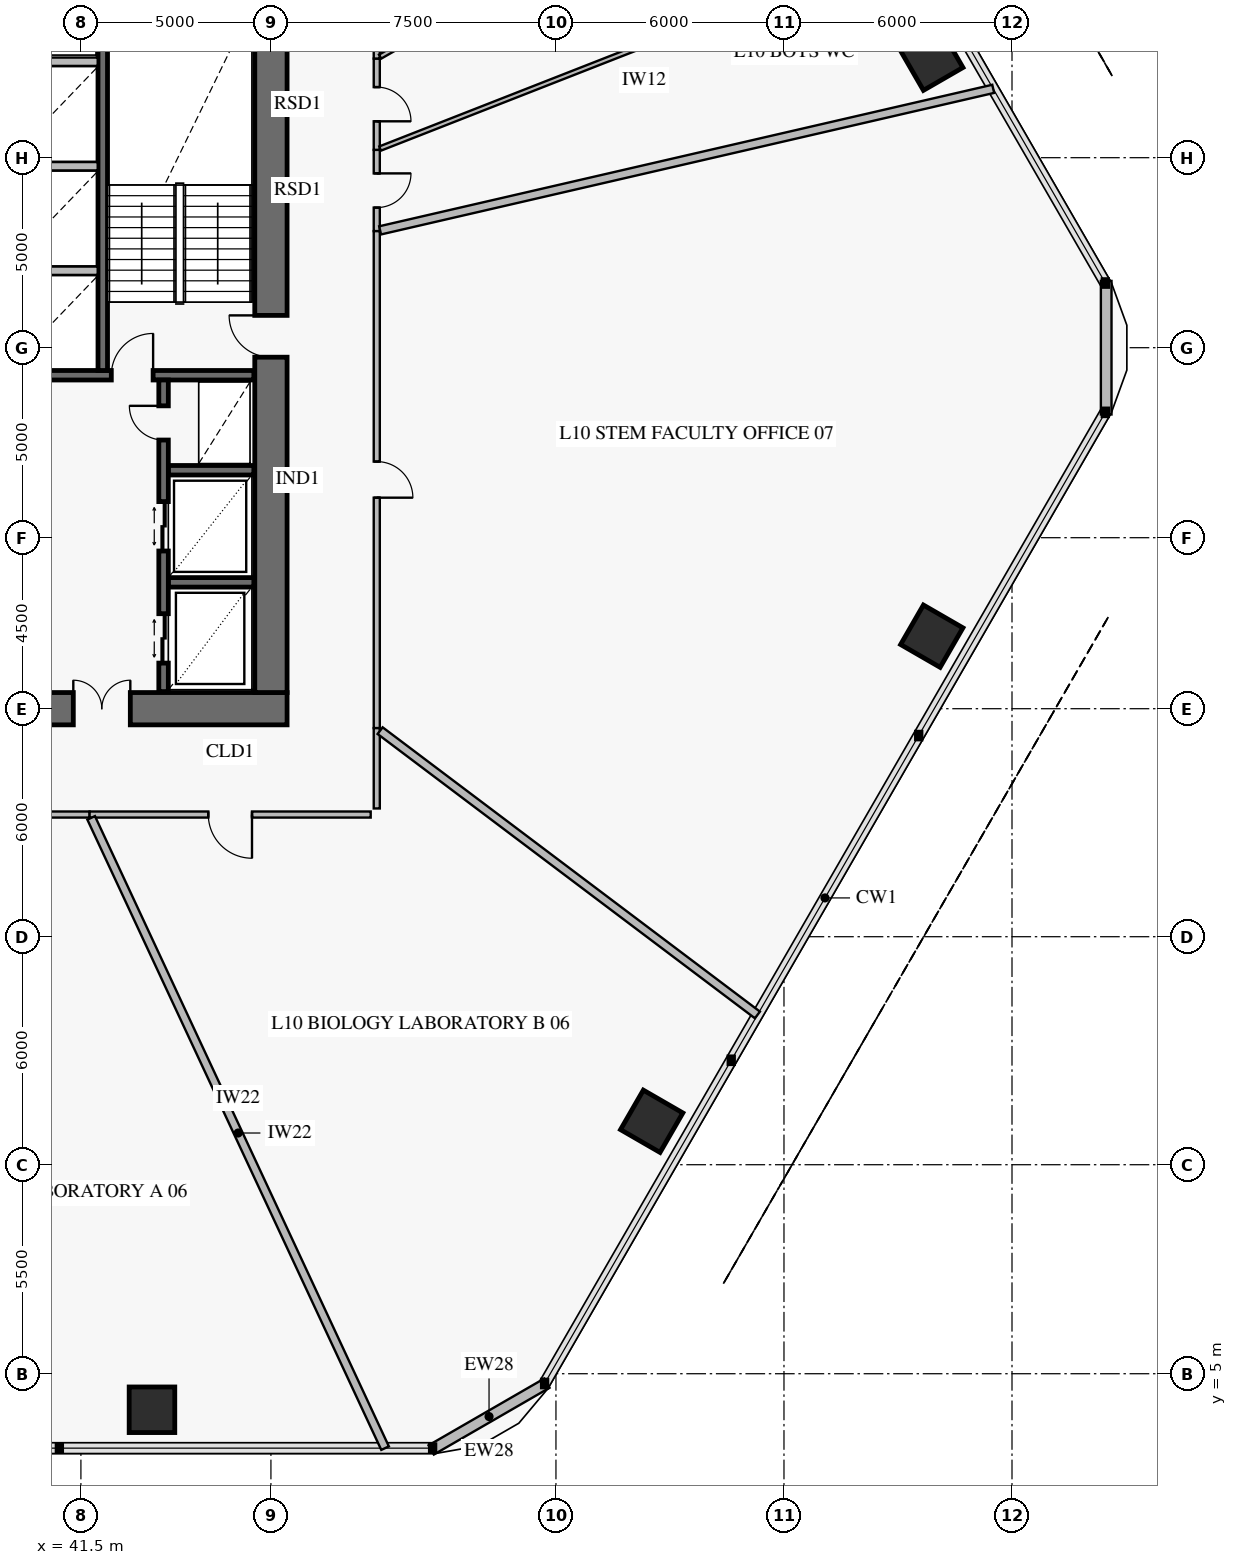
"""IFC4 building model, lengths in metres.
Left out: names, types, materials, properties, quantities, classifications, styles, units other than length and angle.
Written with IfcOpenShell. Run it as: python <this file> out.ifc"""

import sys

from ifc_helpers import new_model, si_unit, direction, frame, frame_2d, origin, origin_2d, place, context, subcontext, project, spatial, rectangle, extrude, element, fill, save


model = new_model("IFC4")
c1 = context("Model", 3, precision=1e-05, world=origin(), true_north=direction((0.0, 1.0)))
c2 = subcontext(c1, "Body", "Model", "MODEL_VIEW")
j1 = project(units=[si_unit("LENGTHUNIT", "METRE"), si_unit("PLANEANGLEUNIT", "RADIAN")], contexts=[c1])
p1 = place(None, origin())
s1 = spatial("IfcSite", under=j1, at=p1, CompositionType="ELEMENT")
p2 = place(p1, origin())
s2 = spatial("IfcBuilding", under=s1, at=p2, CompositionType="ELEMENT")
p3 = place(p2, frame((0.0, 0.0, 41.4)))
s3 = spatial("IfcBuildingStorey", under=s2, at=p3, CompositionType="ELEMENT", Elevation=41.4)
p4 = place(p3, frame((37.35, 22.5, 0.0), z_axis=(0.0, 0.0, 1.0), x_axis=(1.0, 0.0, 0.0)))
e1 = element("IfcWall", 1, at=p4, inside=s3, PredefinedType="SHEAR", context=c2, shape_type="SweptSolid", body=[
    extrude(rectangle(XDim=9.575, YDim=0.85, at=frame_2d((4.788, 0.0))), origin(), (0.0, 0.0, 1.0), 4.2),
])
p5 = place(p4, frame((3.95, 0.0, 0.0)))
e2 = element("IfcOpeningElement", 2, at=p5, cuts=e1, PredefinedType="OPENING", context=c2, shape_type="SweptSolid", body=[
    extrude(rectangle(XDim=1.5, YDim=2.15, at=frame_2d((0.75, 1.075))), frame((0.0, 0.437, 0.0), z_axis=(0.0, -1.0, 0.0), x_axis=(1.0, 0.0, 0.0)), (0.0, 0.0, 1.0), 0.874),
])
p6 = place(p3, frame((46.5, 22.925, 0.0), z_axis=(0.0, 0.0, 1.0), x_axis=(0.0, 1.0, 0.0)))
e3 = element("IfcWall", 3, at=p6, inside=s3, PredefinedType="SHEAR", context=c2, shape_type="SweptSolid", body=[
    extrude(rectangle(XDim=18.15, YDim=0.85, at=frame_2d((9.075, 0.0))), origin(), (0.0, 0.0, 1.0), 4.2),
])
p7 = place(p6, frame((8.825, 0.0, 0.0)))
e4 = element("IfcOpeningElement", 4, at=p7, cuts=e3, PredefinedType="OPENING", context=c2, shape_type="SweptSolid", body=[
    extrude(rectangle(XDim=1.1, YDim=2.15, at=frame_2d((0.55, 1.075))), frame((0.0, 0.437, 0.0), z_axis=(0.0, -1.0, 0.0), x_axis=(1.0, 0.0, 0.0)), (0.0, 0.0, 1.0), 0.874),
])
for number, where, z_axis, x_axis in (
    (5, (63.889, 39.592, 0.0), (0.0, 0.0, 1.0), (-0.5, 0.866, 0.0)),
    (6, (43.37, 4.052, 0.0), (0.0, 0.0, 1.0), (1.0, 0.0, 0.0)),
    (7, (56.519, 11.643, 0.0), (0.0, 0.0, 1.0), (0.5, 0.866, 0.0)),
    (8, (63.889, 24.408, 0.0), (0.0, 0.0, 1.0), (0.5, 0.866, 0.0)),
):
    element("IfcColumn", number, at=place(p3, frame(where, z_axis=z_axis, x_axis=x_axis)), inside=s3, PredefinedType="COLUMN", context=c2, shape_type="SweptSolid", body=[
        extrude(rectangle(XDim=1.2, YDim=1.2, at=origin_2d()), origin(), (0.0, 0.0, 1.0), 3.92),
    ])
p8 = place(p3, frame((53.761, 4.751, 0.0), z_axis=(0.0, 0.0, 1.0), x_axis=(-0.866007452331, -0.500031091541, 0.0)))
e9 = element("IfcWall", 9, at=p8, inside=s3, PredefinedType="SOLIDWALL", context=c2, shape_type="SweptSolid", body=[
    extrude(rectangle(XDim=3.515, YDim=0.28, at=frame_2d((1.757, 0.0))), origin(), (0.0, 0.0, 1.0), 3.92),
])
p9 = place(p3, frame((68.479, 33.758, 0.0), z_axis=(0.0, 0.0, 1.0), x_axis=(0.0, -1.0, 0.0)))
e10 = element("IfcWall", 10, at=p9, inside=s3, PredefinedType="SOLIDWALL", context=c2, shape_type="SweptSolid", body=[
    extrude(rectangle(XDim=3.515, YDim=0.28, at=frame_2d((1.758, 0.0))), origin(), (0.0, 0.0, 1.0), 3.92),
])
p10 = place(p3, frame((25.95, 31.275, 0.0), z_axis=(0.0, 0.0, 1.0), x_axis=(1.0, 0.0, 0.0)))
e11 = element("IfcWall", 11, at=p10, inside=s3, PredefinedType="SOLIDWALL", context=c2, shape_type="SweptSolid", body=[
    extrude(rectangle(XDim=20.1, YDim=0.25, at=frame_2d((10.05, 0.0))), origin(), (0.0, 0.0, 1.0), 4.2),
])
p11 = place(p10, frame((2.6, 0.0, 0.0)))
e12 = element("IfcOpeningElement", 12, at=p11, cuts=e11, PredefinedType="OPENING", context=c2, shape_type="SweptSolid", body=[
    extrude(rectangle(XDim=1.1, YDim=2.15, at=frame_2d((0.55, 1.075))), frame((0.0, 0.137, 0.0), z_axis=(0.0, -1.0, 0.0), x_axis=(1.0, 0.0, 0.0)), (0.0, 0.0, 1.0), 0.274),
])
p12 = place(p10, frame((10.6, 0.0, 0.0)))
e13 = element("IfcOpeningElement", 13, at=p12, cuts=e11, PredefinedType="OPENING", context=c2, shape_type="SweptSolid", body=[
    extrude(rectangle(XDim=1.1, YDim=2.15, at=frame_2d((0.55, 1.075))), frame((0.0, 0.137, 0.0), z_axis=(0.0, -1.0, 0.0), x_axis=(1.0, 0.0, 0.0)), (0.0, 0.0, 1.0), 0.274),
])
p13 = place(p10, frame((16.35, 0.0, 0.0)))
e14 = element("IfcOpeningElement", 14, at=p13, cuts=e11, PredefinedType="OPENING", context=c2, shape_type="SweptSolid", body=[
    extrude(rectangle(XDim=1.1, YDim=2.15, at=frame_2d((0.55, 1.075))), frame((0.0, 0.137, 0.0), z_axis=(0.0, -1.0, 0.0), x_axis=(1.0, 0.0, 0.0)), (0.0, 0.0, 1.0), 0.274),
])
p14 = place(p3, frame((42.075, 31.4, 0.0), z_axis=(0.0, 0.0, 1.0), x_axis=(0.0, 1.0, 0.0)))
e15 = element("IfcWall", 15, at=p14, inside=s3, PredefinedType="SOLIDWALL", context=c2, shape_type="SweptSolid", body=[
    extrude(rectangle(XDim=9.7, YDim=0.25, at=frame_2d((4.85, 0.0))), origin(), (0.0, 0.0, 1.0), 4.2),
])
for number, where, z_axis, x_axis in (
    (16, (43.8, 25.825, 0.0), (0.0, 0.0, 1.0), (1.0, 0.0, 0.0)),
    (17, (43.8, 28.775, 0.0), (0.0, 0.0, 1.0), (1.0, 0.0, 0.0)),
):
    element("IfcWall", number, at=place(p3, frame(where, z_axis=z_axis, x_axis=x_axis)), inside=s3, PredefinedType="SOLIDWALL", context=c2, shape_type="SweptSolid", body=[
        extrude(rectangle(XDim=2.25, YDim=0.25, at=frame_2d((1.125, 0.0))), origin(), (0.0, 0.0, 1.0), 4.2),
    ])
p15 = place(p3, frame((43.675, 22.95, 0.0), z_axis=(0.0, 0.0, 1.0), x_axis=(0.0, 1.0, 0.0)))
e18 = element("IfcWall", 18, at=p15, inside=s3, PredefinedType="SOLIDWALL", context=c2, shape_type="SweptSolid", body=[
    extrude(rectangle(XDim=8.2, YDim=0.25, at=frame_2d((4.1, 0.0))), origin(), (0.0, 0.0, 1.0), 4.2),
])
p16 = place(p15, frame((0.75, 0.0, 0.0)))
e19 = element("IfcOpeningElement", 19, at=p16, cuts=e18, PredefinedType="OPENING", context=c2, shape_type="SweptSolid", body=[
    extrude(rectangle(XDim=1.3, YDim=2.3, at=frame_2d((0.65, 1.15))), frame((0.0, 0.137, 0.0), z_axis=(0.0, -1.0, 0.0), x_axis=(1.0, 0.0, 0.0)), (0.0, 0.0, 1.0), 0.274),
])
p17 = place(p15, frame((3.7, 0.0, 0.0)))
e20 = element("IfcOpeningElement", 20, at=p17, cuts=e18, PredefinedType="OPENING", context=c2, shape_type="SweptSolid", body=[
    extrude(rectangle(XDim=1.3, YDim=2.3, at=frame_2d((0.65, 1.15))), frame((0.0, 0.137, 0.0), z_axis=(0.0, -1.0, 0.0), x_axis=(1.0, 0.0, 0.0)), (0.0, 0.0, 1.0), 0.274),
])
p18 = place(p15, frame((6.62, 0.0, 0.0)))
e21 = element("IfcOpeningElement", 21, at=p18, cuts=e18, PredefinedType="OPENING", context=c2, shape_type="SweptSolid", body=[
    extrude(rectangle(XDim=0.9, YDim=2.1, at=frame_2d((0.45, 1.05))), frame((0.0, 0.137, 0.0), z_axis=(0.0, -1.0, 0.0), x_axis=(1.0, 0.0, 0.0)), (0.0, 0.0, 1.0), 0.274),
])
p19 = place(p3, frame((49.285, 35.067, 0.0), z_axis=(0.0, 0.0, 1.0), x_axis=(0.0, 1.0, 0.0)))
e22 = element("IfcWall", 22, at=p19, inside=s3, PredefinedType="PARTITIONING", context=c2, shape_type="SweptSolid", body=[
    extrude(rectangle(XDim=2.139, YDim=0.16, at=frame_2d((1.07, 0.0))), origin(), (0.0, 0.0, 1.0), 3.22),
])
p20 = place(p19, frame((0.62, 0.0, 0.0)))
e23 = element("IfcOpeningElement", 23, at=p20, cuts=e22, PredefinedType="OPENING", context=c2, shape_type="SweptSolid", body=[
    extrude(rectangle(XDim=0.9, YDim=2.1, at=frame_2d((0.45, 1.05))), frame((0.0, 0.092, 0.0), z_axis=(0.0, -1.0, 0.0), x_axis=(1.0, 0.0, 0.0)), (0.0, 0.0, 1.0), 0.184),
])
p21 = place(p3, frame((49.285, 37.206, 0.0), z_axis=(0.0, 0.0, 1.0), x_axis=(0.0, 1.0, 0.0)))
e24 = element("IfcWall", 24, at=p21, inside=s3, PredefinedType="PARTITIONING", context=c2, shape_type="SweptSolid", body=[
    extrude(rectangle(XDim=2.402, YDim=0.16, at=frame_2d((1.201, 0.0))), origin(), (0.0, 0.0, 1.0), 3.92),
])
p22 = place(p21, frame((0.751, 0.0, 0.0)))
e25 = element("IfcOpeningElement", 25, at=p22, cuts=e24, PredefinedType="OPENING", context=c2, shape_type="SweptSolid", body=[
    extrude(rectangle(XDim=0.9, YDim=2.1, at=frame_2d((0.45, 1.05))), frame((0.0, 0.092, 0.0), z_axis=(0.0, -1.0, 0.0), x_axis=(1.0, 0.0, 0.0)), (0.0, 0.0, 1.0), 0.184),
])
p23 = place(p3, frame((49.285, 39.608, 0.0), z_axis=(0.0, 0.0, 1.0), x_axis=(0.0, 1.0, 0.0)))
e26 = element("IfcWall", 26, at=p23, inside=s3, PredefinedType="PARTITIONING", context=c2, shape_type="SweptSolid", body=[
    extrude(rectangle(XDim=2.403, YDim=0.16, at=frame_2d((1.201, 0.0))), origin(), (0.0, 0.0, 1.0), 3.92),
])
p24 = place(p23, frame((0.751, 0.0, 0.0)))
e27 = element("IfcOpeningElement", 27, at=p24, cuts=e26, PredefinedType="OPENING", context=c2, shape_type="SweptSolid", body=[
    extrude(rectangle(XDim=0.9, YDim=2.1, at=frame_2d((0.45, 1.05))), frame((0.0, 0.092, 0.0), z_axis=(0.0, -1.0, 0.0), x_axis=(1.0, 0.0, 0.0)), (0.0, 0.0, 1.0), 0.184),
])
p25 = place(p3, frame((35.356, 19.715, 0.0), z_axis=(0.0, 0.0, 1.0), x_axis=(1.0, 0.0, 0.0)))
e28 = element("IfcWall", 28, at=p25, inside=s3, PredefinedType="PARTITIONING", context=c2, shape_type="SweptSolid", body=[
    extrude(rectangle(XDim=6.372, YDim=0.16, at=frame_2d((3.186, 0.0))), origin(), (0.0, 0.0, 1.0), 3.22),
])
p26 = place(p25, frame((2.611, 0.0, 0.0)))
e29 = element("IfcOpeningElement", 29, at=p26, cuts=e28, PredefinedType="OPENING", context=c2, shape_type="SweptSolid", body=[
    extrude(rectangle(XDim=1.15, YDim=2.2, at=frame_2d((0.575, 1.1))), frame((0.0, 0.092, 0.0), z_axis=(0.0, -1.0, 0.0), x_axis=(1.0, 0.0, 0.0)), (0.0, 0.0, 1.0), 0.184),
])
p27 = place(p3, frame((41.729, 19.715, 0.0), z_axis=(0.0, 0.0, 1.0), x_axis=(1.0, 0.0, 0.0)))
e30 = element("IfcWall", 30, at=p27, inside=s3, PredefinedType="PARTITIONING", context=c2, shape_type="SweptSolid", body=[
    extrude(rectangle(XDim=7.396, YDim=0.16, at=frame_2d((3.698, 0.0))), origin(), (0.0, 0.0, 1.0), 3.22),
])
p28 = place(p27, frame((3.123, 0.0, 0.0)))
e31 = element("IfcOpeningElement", 31, at=p28, cuts=e30, PredefinedType="OPENING", context=c2, shape_type="SweptSolid", body=[
    extrude(rectangle(XDim=1.15, YDim=2.2, at=frame_2d((0.575, 1.1))), frame((0.0, 0.092, 0.0), z_axis=(0.0, -1.0, 0.0), x_axis=(1.0, 0.0, 0.0)), (0.0, 0.0, 1.0), 0.184),
])
p29 = place(p3, frame((49.285, 21.989, 0.0), z_axis=(0.0, 0.0, 1.0), x_axis=(0.0, 1.0, 0.0)))
e32 = element("IfcWall", 32, at=p29, inside=s3, PredefinedType="PARTITIONING", context=c2, shape_type="SweptSolid", body=[
    extrude(rectangle(XDim=13.078, YDim=0.16, at=frame_2d((6.539, 0.0))), origin(), (0.0, 0.0, 1.0), 3.22),
])
p30 = place(p29, frame((6.064, 0.0, 0.0)))
e33 = element("IfcOpeningElement", 33, at=p30, cuts=e32, PredefinedType="OPENING", context=c2, shape_type="SweptSolid", body=[
    extrude(rectangle(XDim=0.95, YDim=2.1, at=frame_2d((0.475, 1.05))), frame((0.0, 0.092, 0.0), z_axis=(0.0, -1.0, 0.0), x_axis=(1.0, 0.0, 0.0)), (0.0, 0.0, 1.0), 0.184),
])
for number, where, z_axis, x_axis in (
    (34, (39.558, 34.025, 0.0), (0.0, 0.0, 1.0), (1.0, 0.0, 0.0)),
    (35, (39.558, 36.775, 0.0), (0.0, 0.0, 1.0), (1.0, 0.0, 0.0)),
    (36, (39.558, 39.525, 0.0), (0.0, 0.0, 1.0), (1.0, 0.0, 0.0)),
):
    element("IfcWall", number, at=place(p3, frame(where, z_axis=z_axis, x_axis=x_axis)), inside=s3, PredefinedType="PARTITIONING", context=c2, shape_type="SweptSolid", body=[
        extrude(rectangle(XDim=2.384, YDim=0.22, at=frame_2d((1.192, 0.0))), origin(), (0.0, 0.0, 1.0), 3.92),
    ])
p31 = place(p3, frame((49.373, 35.087, 0.0), z_axis=(0.0, 0.0, 1.0), x_axis=(0.974368575461, 0.224957505217, 0.0)))
e37 = element("IfcWall", 37, at=p31, inside=s3, PredefinedType="PARTITIONING", context=c2, shape_type="SweptSolid", body=[
    extrude(rectangle(XDim=16.557, YDim=0.22, at=frame_2d((8.278, 0.0))), origin(), (0.0, 0.0, 1.0), 3.17),
])
p32 = place(p3, frame((49.373, 37.241, 0.0), z_axis=(0.0, 0.0, 1.0), x_axis=(0.931056574404, 0.364874848761, 0.0)))
e38 = element("IfcWall", 38, at=p32, inside=s3, PredefinedType="PARTITIONING", context=c2, shape_type="SweptSolid", body=[
    extrude(rectangle(XDim=14.925, YDim=0.12, at=frame_2d((7.462, 0.0))), origin(), (0.0, 0.0, 1.0), 3.17),
])
p33 = place(p3, frame((49.373, 39.659, 0.0), z_axis=(0.0, 0.0, 1.0), x_axis=(0.867753476972, 0.496994872412, 0.0)))
e39 = element("IfcWall", 39, at=p33, inside=s3, PredefinedType="PARTITIONING", context=c2, shape_type="SweptSolid", body=[
    extrude(rectangle(XDim=4.545, YDim=0.12, at=frame_2d((2.272, 0.0))), origin(), (0.0, 0.0, 1.0), 3.92),
])
p34 = place(p3, frame((41.77, 19.627, 0.0), z_axis=(0.0, 0.0, 1.0), x_axis=(0.422616678834, -0.906308525156, 0.0)))
e40 = element("IfcWall", 40, at=p34, inside=s3, PredefinedType="PARTITIONING", context=c2, shape_type="SweptSolid", body=[
    extrude(rectangle(XDim=18.3, YDim=0.22, at=frame_2d((9.15, 0.0))), origin(), (0.0, 0.0, 1.0), 3.17),
])
p35 = place(p3, frame((49.285, 19.875, 0.0), z_axis=(0.0, 0.0, 1.0), x_axis=(0.0, 1.0, 0.0)))
e41 = element("IfcWall", 41, at=p35, inside=s3, PredefinedType="PARTITIONING", context=c2, shape_type="SweptSolid", body=[
    extrude(rectangle(XDim=2.114, YDim=0.16, at=frame_2d((1.057, 0.0))), origin(), (0.0, 0.0, 1.0), 3.92),
])
p36 = place(p3, frame((49.373, 21.923, 0.0), z_axis=(0.0, 0.0, 1.0), x_axis=(0.798630996951, -0.601821012187, 0.0)))
e42 = element("IfcWall", 42, at=p36, inside=s3, PredefinedType="PARTITIONING", context=c2, shape_type="SweptSolid", body=[
    extrude(rectangle(XDim=12.431, YDim=0.22, at=frame_2d((6.215, 0.0))), origin(), (0.0, 0.0, 1.0), 3.17),
])
p37 = place(p7, origin())
e43 = element("IfcDoor", 43, at=p37, inside=s3, OperationType="SINGLE_SWING_RIGHT", PredefinedType="USERDEFINED", context=c2, shape_type="SweptSolid", body=[
    extrude(rectangle(XDim=1.1, YDim=2.15, at=frame_2d((0.55, 1.075))), frame((0.0, 0.025, 0.0), z_axis=(0.0, -1.0, 0.0), x_axis=(1.0, 0.0, 0.0)), (0.0, 0.0, 1.0), 0.05),
])
fill(e4, e43)
p38 = place(p5, origin())
e44 = element("IfcDoor", 44, at=p38, inside=s3, OperationType="DOUBLE_DOOR_SINGLE_SWING", PredefinedType="DOOR", context=c2, shape_type="SweptSolid", body=[
    extrude(rectangle(XDim=1.5, YDim=2.15, at=frame_2d((0.75, 1.075))), frame((0.0, 0.025, 0.0), z_axis=(0.0, -1.0, 0.0), x_axis=(1.0, 0.0, 0.0)), (0.0, 0.0, 1.0), 0.05),
])
fill(e2, e44)
p39 = place(p13, origin())
e45 = element("IfcDoor", 45, at=p39, inside=s3, OperationType="SINGLE_SWING_RIGHT", PredefinedType="USERDEFINED", context=c2, shape_type="SweptSolid", body=[
    extrude(rectangle(XDim=1.1, YDim=2.15, at=frame_2d((0.55, 1.075))), frame((0.0, 0.025, 0.0), z_axis=(0.0, -1.0, 0.0), x_axis=(1.0, 0.0, 0.0)), (0.0, 0.0, 1.0), 0.05),
])
fill(e14, e45)
p40 = place(p16, origin())
e46 = element("IfcDoor", 46, at=p40, inside=s3, OperationType="DOUBLE_DOOR_SLIDING", PredefinedType="DOOR", context=c2, shape_type="SweptSolid", body=[
    extrude(rectangle(XDim=1.3, YDim=2.3, at=frame_2d((0.65, 1.15))), frame((0.0, 0.025, 0.0), z_axis=(0.0, -1.0, 0.0), x_axis=(1.0, 0.0, 0.0)), (0.0, 0.0, 1.0), 0.05),
])
fill(e19, e46)
p41 = place(p17, origin())
e47 = element("IfcDoor", 47, at=p41, inside=s3, OperationType="DOUBLE_DOOR_SLIDING", PredefinedType="DOOR", context=c2, shape_type="SweptSolid", body=[
    extrude(rectangle(XDim=1.3, YDim=2.3, at=frame_2d((0.65, 1.15))), frame((0.0, 0.025, 0.0), z_axis=(0.0, -1.0, 0.0), x_axis=(1.0, 0.0, 0.0)), (0.0, 0.0, 1.0), 0.05),
])
fill(e20, e47)
p42 = place(p18, origin())
e48 = element("IfcDoor", 48, at=p42, inside=s3, OperationType="SINGLE_SWING_RIGHT", PredefinedType="DOOR", context=c2, shape_type="SweptSolid", body=[
    extrude(rectangle(XDim=0.9, YDim=2.1, at=frame_2d((0.45, 1.05))), frame((0.0, 0.025, 0.0), z_axis=(0.0, -1.0, 0.0), x_axis=(1.0, 0.0, 0.0)), (0.0, 0.0, 1.0), 0.05),
])
fill(e21, e48)
p43 = place(p20, frame((0.9, 0.0, 0.0), z_axis=(0.0, 0.0, 1.0), x_axis=(-1.0, 0.0, 0.0)))
e49 = element("IfcDoor", 49, at=p43, inside=s3, OperationType="SINGLE_SWING_LEFT", PredefinedType="DOOR", context=c2, shape_type="SweptSolid", body=[
    extrude(rectangle(XDim=0.9, YDim=2.1, at=frame_2d((0.45, 1.05))), frame((0.0, 0.025, 0.0), z_axis=(0.0, -1.0, 0.0), x_axis=(1.0, 0.0, 0.0)), (0.0, 0.0, 1.0), 0.05),
])
fill(e23, e49)
p44 = place(p22, frame((0.9, 0.0, 0.0), z_axis=(0.0, 0.0, 1.0), x_axis=(-1.0, 0.0, 0.0)))
e50 = element("IfcDoor", 50, at=p44, inside=s3, OperationType="SINGLE_SWING_RIGHT", PredefinedType="DOOR", context=c2, shape_type="SweptSolid", body=[
    extrude(rectangle(XDim=0.9, YDim=2.1, at=frame_2d((0.45, 1.05))), frame((0.0, 0.025, 0.0), z_axis=(0.0, -1.0, 0.0), x_axis=(1.0, 0.0, 0.0)), (0.0, 0.0, 1.0), 0.05),
])
fill(e25, e50)
p45 = place(p28, frame((1.15, 0.0, 0.0), z_axis=(0.0, 0.0, 1.0), x_axis=(-1.0, 0.0, 0.0)))
e51 = element("IfcDoor", 51, at=p45, inside=s3, OperationType="SINGLE_SWING_LEFT", PredefinedType="DOOR", context=c2, shape_type="SweptSolid", body=[
    extrude(rectangle(XDim=1.15, YDim=2.2, at=frame_2d((0.575, 1.1))), frame((0.0, 0.025, 0.0), z_axis=(0.0, -1.0, 0.0), x_axis=(1.0, 0.0, 0.0)), (0.0, 0.0, 1.0), 0.05),
])
fill(e31, e51)
p46 = place(p30, frame((0.95, 0.0, 0.0), z_axis=(0.0, 0.0, 1.0), x_axis=(-1.0, 0.0, 0.0)))
e52 = element("IfcDoor", 52, at=p46, inside=s3, OperationType="SINGLE_SWING_RIGHT", PredefinedType="DOOR", context=c2, shape_type="SweptSolid", body=[
    extrude(rectangle(XDim=0.95, YDim=2.1, at=frame_2d((0.475, 1.05))), frame((0.0, 0.025, 0.0), z_axis=(0.0, -1.0, 0.0), x_axis=(1.0, 0.0, 0.0)), (0.0, 0.0, 1.0), 0.05),
])
fill(e33, e52)
save(model, sys.argv[1])
